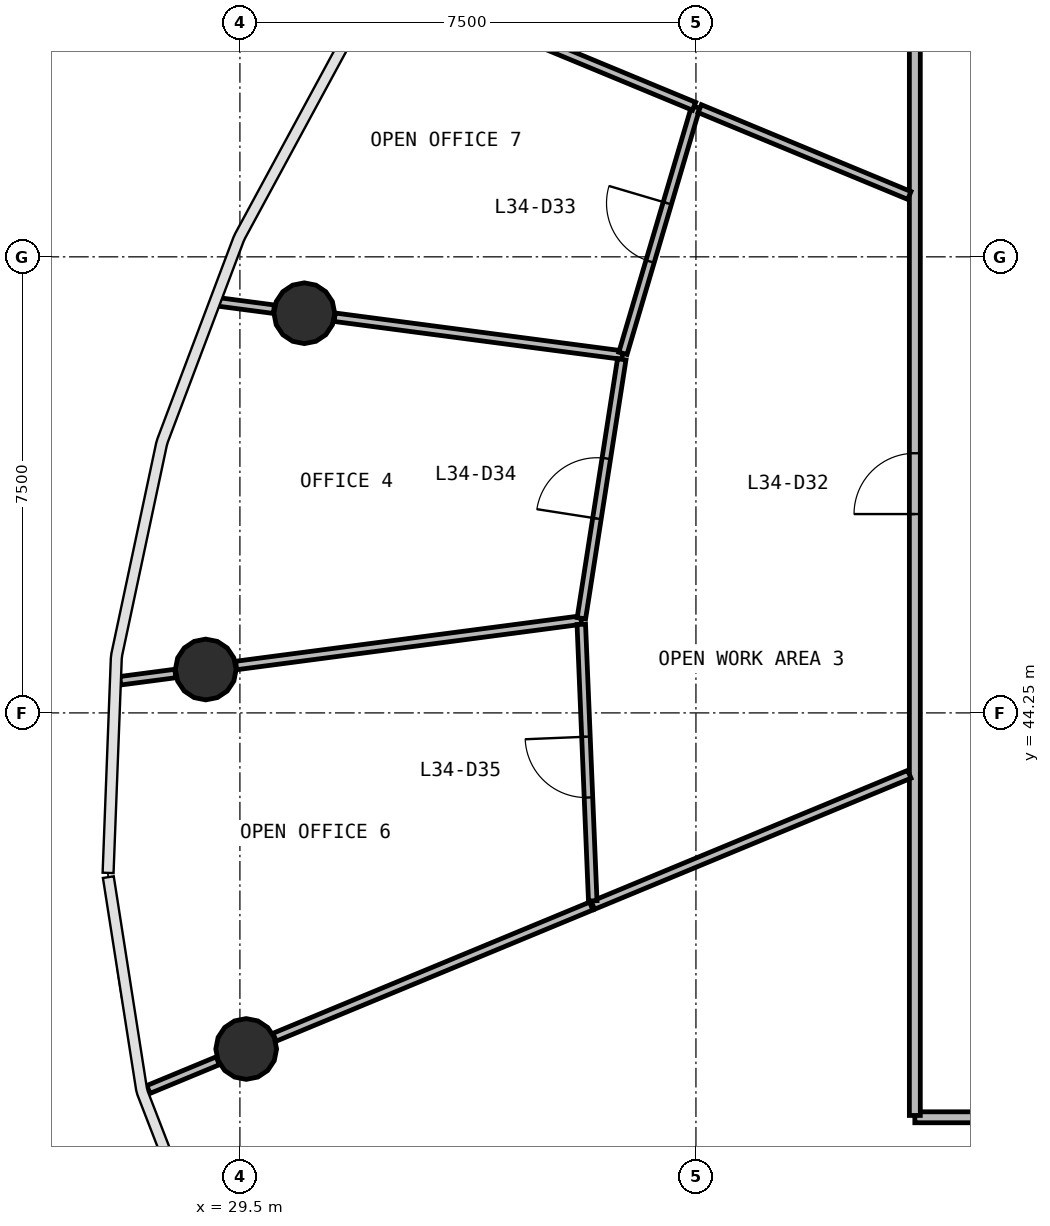
"""IFC4 building model, lengths in metres.
Left out: names, types, materials, properties, quantities, classifications, styles, units other than length and angle.
Written with IfcOpenShell. Run it as: python <this file> out.ifc"""

import sys

from ifc_helpers import new_model, si_unit, direction, frame, frame_2d, origin, origin_2d, place, context, subcontext, project, spatial, rectangle, circle, extrude, source, transform, mapped, element, fill, save


model = new_model("IFC4")
c1 = context("Model", 3, precision=1e-05, world=origin(), true_north=direction((0.0, 1.0)))
c2 = subcontext(c1, "Body", "Model", "MODEL_VIEW")
j1 = project(units=[si_unit("LENGTHUNIT", "METRE"), si_unit("PLANEANGLEUNIT", "RADIAN")], contexts=[c1])
p1 = place(None, origin())
s1 = spatial("IfcSite", under=j1, at=p1, CompositionType="ELEMENT")
p2 = place(p1, origin())
s2 = spatial("IfcBuilding", under=s1, at=p2, CompositionType="ELEMENT")
p3 = place(p2, frame((0.0, 0.0, 144.8)))
s3 = spatial("IfcBuildingStorey", under=s2, at=p3, CompositionType="ELEMENT", Elevation=144.8)
m1 = source(origin(), c2, "Body", "SweptSolid", [
    extrude(circle(Radius=0.5, at=origin_2d()), origin(), (0.0, 0.0, 1.0), 3.9),
])
for number, where, z_axis, x_axis in (
    (1, (30.559, 50.823, 0.0), (0.0, 0.0, 1.0), (1.0, 0.0, 0.0)),
    (2, (28.938, 44.964, 0.0), (0.0, 0.0, 1.0), (1.0, 0.0, 0.0)),
    (3, (29.603, 38.723, 0.0), (0.0, 0.0, 1.0), (1.0, 0.0, 0.0)),
):
    element("IfcColumn", number, at=place(p3, frame(where, z_axis=z_axis, x_axis=x_axis)), inside=s3, PredefinedType="COLUMN", context=c2, shape_type="MappedRepresentation", body=[
        mapped(m1, transform((0.0, 0.0, 0.0), scale=1.0)),
    ])
p4 = place(p3, frame((63.4, 37.6, 0.0), z_axis=(0.0, 0.0, 1.0), x_axis=(-1.0, 0.0, 0.0)))
e4 = element("IfcWall", 4, at=p4, inside=s3, PredefinedType="PARTITIONING", context=c2, shape_type="SweptSolid", body=[
    extrude(rectangle(XDim=22.8, YDim=0.18, at=frame_2d((11.4, 0.0))), origin(), (0.0, 0.0, 1.0), 2.88),
])
p5 = place(p4, frame((12.95, 0.0, 0.0)))
e5 = element("IfcOpeningElement", 5, at=p5, cuts=e4, PredefinedType="OPENING", context=c2, shape_type="SweptSolid", body=[
    extrude(rectangle(XDim=1.0, YDim=2.1, at=frame_2d((0.5, 1.05))), frame((0.0, 0.1, 0.0), z_axis=(0.0, -1.0, 0.0), x_axis=(1.0, 0.0, 0.0)), (0.0, 0.0, 1.0), 0.2),
])
p6 = place(p4, frame((10.95, 0.0, 0.0)))
e6 = element("IfcOpeningElement", 6, at=p6, cuts=e4, PredefinedType="OPENING", context=c2, shape_type="SweptSolid", body=[
    extrude(rectangle(XDim=1.0, YDim=2.1, at=frame_2d((0.5, 1.05))), frame((0.0, 0.1, 0.0), z_axis=(0.0, -1.0, 0.0), x_axis=(1.0, 0.0, 0.0)), (0.0, 0.0, 1.0), 0.2),
])
p7 = place(p3, frame((40.6, 37.63, 0.0), z_axis=(0.0, 0.0, 1.0), x_axis=(0.0, 1.0, 0.0)))
e7 = element("IfcWall", 7, at=p7, inside=s3, PredefinedType="PARTITIONING", context=c2, shape_type="SweptSolid", body=[
    extrude(rectangle(XDim=20.74, YDim=0.18, at=frame_2d((10.37, 0.0))), origin(), (0.0, 0.0, 1.0), 2.88),
])
p8 = place(p7, frame((9.89, 0.0, 0.0)))
e8 = element("IfcOpeningElement", 8, at=p8, cuts=e7, PredefinedType="OPENING", context=c2, shape_type="SweptSolid", body=[
    extrude(rectangle(XDim=1.0, YDim=2.1, at=frame_2d((0.5, 1.05))), frame((0.0, 0.1, 0.0), z_axis=(0.0, -1.0, 0.0), x_axis=(1.0, 0.0, 0.0)), (0.0, 0.0, 1.0), 0.2),
])
p9 = place(p3, frame((40.51, 43.241, 0.0), z_axis=(0.0, 0.0, 1.0), x_axis=(-0.923876322458, -0.382691182028, 0.0)))
e9 = element("IfcWall", 9, at=p9, inside=s3, PredefinedType="PARTITIONING", context=c2, shape_type="SweptSolid", body=[
    extrude(rectangle(XDim=5.633, YDim=0.14, at=frame_2d((2.816, 0.0))), origin(), (0.0, 0.0, 1.0), 2.88),
])
p10 = place(p3, frame((35.112, 45.777, 0.0), z_axis=(0.0, 0.0, 1.0), x_axis=(-0.991447469254, -0.130506381877, 0.0)))
e10 = element("IfcWall", 10, at=p10, inside=s3, PredefinedType="PARTITIONING", context=c2, shape_type="SweptSolid", body=[
    extrude(rectangle(XDim=5.722, YDim=0.14, at=frame_2d((2.861, 0.0))), origin(), (0.0, 0.0, 1.0), 2.88),
])
p11 = place(p3, frame((35.278, 41.073, 0.0), z_axis=(0.0, 0.0, 1.0), x_axis=(-0.923885931512, -0.382667983445, 0.0)))
e11 = element("IfcWall", 11, at=p11, inside=s3, PredefinedType="PARTITIONING", context=c2, shape_type="SweptSolid", body=[
    extrude(rectangle(XDim=5.637, YDim=0.14, at=frame_2d((2.819, 0.0))), origin(), (0.0, 0.0, 1.0), 2.88),
])
p12 = place(p3, frame((35.791, 50.134, 0.0), z_axis=(0.0, 0.0, 1.0), x_axis=(-0.99144767747, 0.130504800063, 0.0)))
e12 = element("IfcWall", 12, at=p12, inside=s3, PredefinedType="PARTITIONING", context=c2, shape_type="SweptSolid", body=[
    extrude(rectangle(XDim=4.772, YDim=0.14, at=frame_2d((2.386, 0.0))), origin(), (0.0, 0.0, 1.0), 2.88),
])
p13 = place(p3, frame((35.302, 41.159, 0.0), z_axis=(0.0, 0.0, 1.0), x_axis=(-0.041309210476, 0.999146410257, 0.0)))
e13 = element("IfcWall", 13, at=p13, inside=s3, PredefinedType="PARTITIONING", context=c2, shape_type="SweptSolid", body=[
    extrude(rectangle(XDim=4.551, YDim=0.14, at=frame_2d((2.275, 0.0))), origin(), (0.0, 0.0, 1.0), 2.88),
])
p14 = place(p13, frame((1.701, 0.0, 0.0)))
e14 = element("IfcOpeningElement", 14, at=p14, cuts=e13, PredefinedType="OPENING", context=c2, shape_type="SweptSolid", body=[
    extrude(rectangle(XDim=1.0, YDim=2.1, at=frame_2d((0.5, 1.05))), frame((0.0, 0.08, 0.0), z_axis=(0.0, -1.0, 0.0), x_axis=(1.0, 0.0, 0.0)), (0.0, 0.0, 1.0), 0.16),
])
p15 = place(p3, frame((35.116, 45.806, 0.0), z_axis=(0.0, 0.0, 1.0), x_axis=(0.153963874662, 0.988076477455, 0.0)))
e15 = element("IfcWall", 15, at=p15, inside=s3, PredefinedType="PARTITIONING", context=c2, shape_type="SweptSolid", body=[
    extrude(rectangle(XDim=4.31, YDim=0.14, at=frame_2d((2.155, 0.0))), origin(), (0.0, 0.0, 1.0), 2.88),
])
p16 = place(p15, frame((1.66, 0.0, 0.0)))
e16 = element("IfcOpeningElement", 16, at=p16, cuts=e15, PredefinedType="OPENING", context=c2, shape_type="SweptSolid", body=[
    extrude(rectangle(XDim=1.0, YDim=2.1, at=frame_2d((0.5, 1.05))), frame((0.0, 0.08, 0.0), z_axis=(0.0, -1.0, 0.0), x_axis=(1.0, 0.0, 0.0)), (0.0, 0.0, 1.0), 0.16),
])
p17 = place(p3, frame((35.799, 50.163, 0.0), z_axis=(0.0, 0.0, 1.0), x_axis=(0.283470538005, 0.958980945631, 0.0)))
e17 = element("IfcWall", 17, at=p17, inside=s3, PredefinedType="PARTITIONING", context=c2, shape_type="SweptSolid", body=[
    extrude(rectangle(XDim=4.225, YDim=0.14, at=frame_2d((2.113, 0.0))), origin(), (0.0, 0.0, 1.0), 2.88),
])
p18 = place(p17, frame((1.575, 0.0, 0.0)))
e18 = element("IfcOpeningElement", 18, at=p18, cuts=e17, PredefinedType="OPENING", context=c2, shape_type="SweptSolid", body=[
    extrude(rectangle(XDim=1.0, YDim=2.1, at=frame_2d((0.5, 1.05))), frame((0.0, 0.08, 0.0), z_axis=(0.0, -1.0, 0.0), x_axis=(1.0, 0.0, 0.0)), (0.0, 0.0, 1.0), 0.16),
])
p19 = place(p3, frame((40.51, 52.759, 0.0), z_axis=(0.0, 0.0, 1.0), x_axis=(-0.923878101824, 0.382686886332, 0.0)))
e19 = element("IfcWall", 19, at=p19, inside=s3, PredefinedType="PARTITIONING", context=c2, shape_type="SweptSolid", body=[
    extrude(rectangle(XDim=3.732, YDim=0.14, at=frame_2d((1.866, 0.0))), origin(), (0.0, 0.0, 1.0), 2.88),
])
p20 = place(p3, frame((36.969, 54.226, 0.0), z_axis=(0.0, 0.0, 1.0), x_axis=(-0.923864859272, 0.382718854779, 0.0)))
e20 = element("IfcWall", 20, at=p20, inside=s3, PredefinedType="PARTITIONING", context=c2, shape_type="SweptSolid", body=[
    extrude(rectangle(XDim=3.466, YDim=0.14, at=frame_2d((1.733, 0.0))), origin(), (0.0, 0.0, 1.0), 2.88),
])
p21 = place(p3, frame((29.137, 38.53, 0.0), z_axis=(0.0, 0.0, 1.0), x_axis=(-0.923857958789, -0.382735511786, 0.0)))
e21 = element("IfcWall", 21, at=p21, inside=s3, PredefinedType="PARTITIONING", context=c2, shape_type="SweptSolid", body=[
    extrude(rectangle(XDim=1.236, YDim=0.14, at=frame_2d((0.618, 0.0))), origin(), (0.0, 0.0, 1.0), 2.88),
])
p22 = place(p3, frame((30.059, 50.889, 0.0), z_axis=(0.0, 0.0, 1.0), x_axis=(-0.991463350104, 0.130385679429, 0.0)))
e22 = element("IfcWall", 22, at=p22, inside=s3, PredefinedType="PARTITIONING", context=c2, shape_type="SweptSolid", body=[
    extrude(rectangle(XDim=0.917, YDim=0.14, at=frame_2d((0.459, 0.0))), origin(), (0.0, 0.0, 1.0), 2.88),
])
p23 = place(p3, frame((28.438, 44.898, 0.0), z_axis=(0.0, 0.0, 1.0), x_axis=(-0.991464295553, -0.130378489957, 0.0)))
e23 = element("IfcWall", 23, at=p23, inside=s3, PredefinedType="PARTITIONING", context=c2, shape_type="SweptSolid", body=[
    extrude(rectangle(XDim=0.914, YDim=0.14, at=frame_2d((0.457, 0.0))), origin(), (0.0, 0.0, 1.0), 2.88),
])
m2 = source(origin(), c2, "Body", "SweptSolid", [
    extrude(rectangle(XDim=1.0, YDim=2.1, at=frame_2d((0.5, 1.05))), frame((0.0, 0.025, 0.0), z_axis=(0.0, -1.0, 0.0), x_axis=(1.0, 0.0, 0.0)), (0.0, 0.0, 1.0), 0.05),
])
p24 = place(p8, origin())
e24 = element("IfcDoor", 24, at=p24, inside=s3, OperationType="SINGLE_SWING_LEFT", PredefinedType="DOOR", context=c2, shape_type="MappedRepresentation", body=[
    mapped(m2, transform((0.0, 0.0, 0.0), scale=1.0)),
])
fill(e8, e24)
p25 = place(p18, origin())
e25 = element("IfcDoor", 25, at=p25, inside=s3, OperationType="SINGLE_SWING_RIGHT", PredefinedType="DOOR", context=c2, shape_type="MappedRepresentation", body=[
    mapped(m2, transform((0.0, 0.0, 0.0), scale=1.0)),
])
fill(e18, e25)
p26 = place(p16, origin())
e26 = element("IfcDoor", 26, at=p26, inside=s3, OperationType="SINGLE_SWING_LEFT", PredefinedType="DOOR", context=c2, shape_type="MappedRepresentation", body=[
    mapped(m2, transform((0.0, 0.0, 0.0), scale=1.0)),
])
fill(e16, e26)
p27 = place(p14, origin())
e27 = element("IfcDoor", 27, at=p27, inside=s3, OperationType="SINGLE_SWING_RIGHT", PredefinedType="DOOR", context=c2, shape_type="MappedRepresentation", body=[
    mapped(m2, transform((0.0, 0.0, 0.0), scale=1.0)),
])
fill(e14, e27)
save(model, sys.argv[1])
